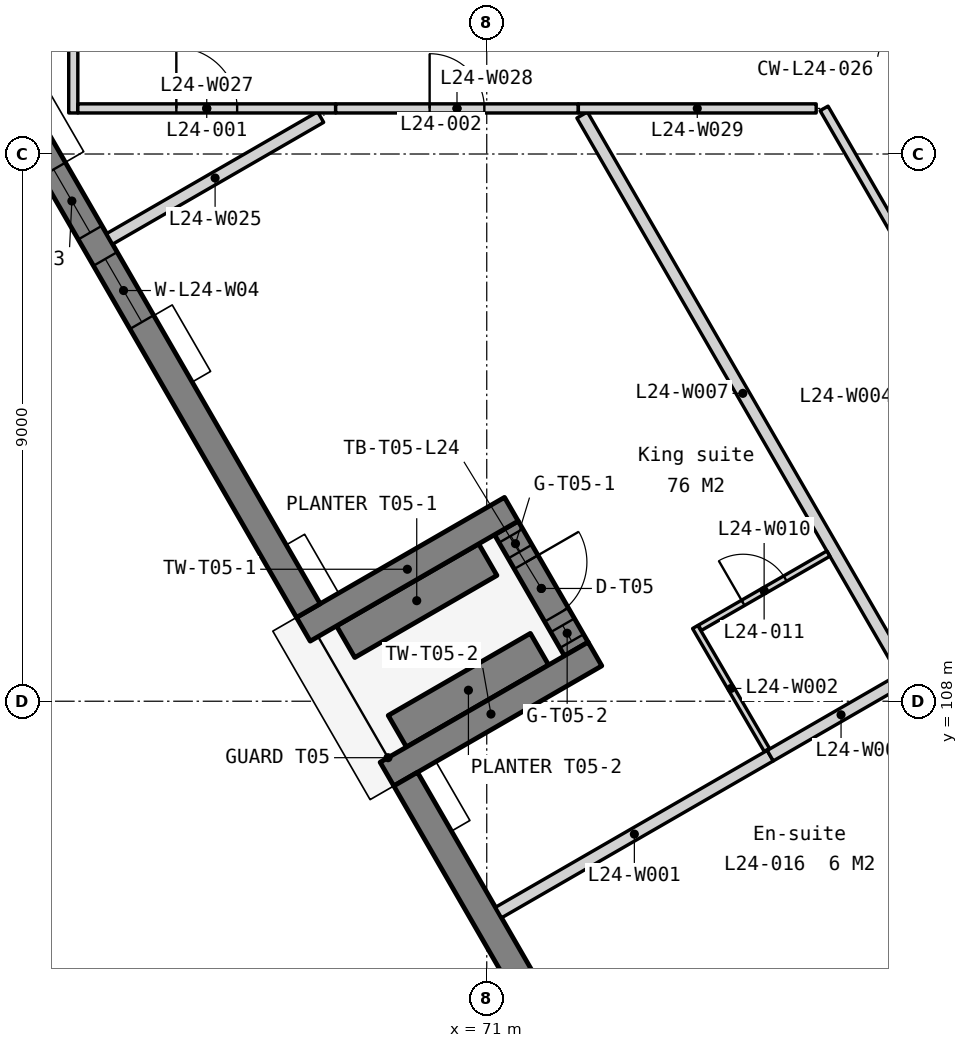
"""IFC4 building model, lengths in metres.
Left out: names, types, materials, properties, quantities, classifications, styles, units other than length and angle.
Written with IfcOpenShell. Run it as: python <this file> out.ifc"""

import sys

from ifc_helpers import new_model, si_unit, direction, frame, frame_2d, origin, place, context, subcontext, project, spatial, polyline, rectangle, outline, extrude, element, fill, save


model = new_model("IFC4")
c1 = context("Model", 3, precision=1e-05, world=origin(), true_north=direction((0.0, 1.0)))
c2 = subcontext(c1, "Body", "Model", "MODEL_VIEW")
j1 = project(units=[si_unit("LENGTHUNIT", "METRE"), si_unit("PLANEANGLEUNIT", "RADIAN")], contexts=[c1])
p1 = place(None, origin())
s1 = spatial("IfcSite", under=j1, at=p1, CompositionType="ELEMENT")
p2 = place(p1, origin())
s2 = spatial("IfcBuilding", under=s1, at=p2, CompositionType="ELEMENT")
p3 = place(p2, frame((0.0, 0.0, 99.3)))
s3 = spatial("IfcBuildingStorey", under=s2, at=p3, CompositionType="ELEMENT", Elevation=99.3)
p4 = place(p3, frame((56.073, 130.263, -0.15), z_axis=(0.0, 0.0, 1.0), x_axis=(0.500002343971, -0.866024050488, 0.0)))
e1 = element("IfcWall", 1, at=p4, inside=s3, PredefinedType="SOLIDWALL", context=c2, shape_type="SweptSolid", body=[
    extrude(outline(polyline([(0.0, 0.0), (0.0, 3.5), (23.986, 3.5), (23.986, 0.0), (0.0, 0.0)])), frame((0.0, 0.225, 0.0), z_axis=(0.0, -1.0, 0.0), x_axis=(1.0, 0.0, 0.0)), (0.0, 0.0, 1.0), 0.45),
])
p5 = place(p4, frame((7.079, 0.0, 1.05)))
e2 = element("IfcOpeningElement", 2, at=p5, cuts=e1, PredefinedType="OPENING", context=c2, shape_type="SweptSolid", body=[
    extrude(rectangle(XDim=1.2, YDim=1.5, at=frame_2d((0.6, 0.75))), frame((0.0, 0.235, 0.0), z_axis=(0.0, -1.0, 0.0), x_axis=(1.0, 0.0, 0.0)), (0.0, 0.0, 1.0), 0.47),
])
p6 = place(p4, frame((8.779, 0.0, 1.05)))
e3 = element("IfcOpeningElement", 3, at=p6, cuts=e1, PredefinedType="OPENING", context=c2, shape_type="SweptSolid", body=[
    extrude(rectangle(XDim=1.2, YDim=1.5, at=frame_2d((0.6, 0.75))), frame((0.0, 0.235, 0.0), z_axis=(0.0, -1.0, 0.0), x_axis=(1.0, 0.0, 0.0)), (0.0, 0.0, 1.0), 0.47),
])
p7 = place(p4, frame((15.607, 0.0, 1.05)))
e4 = element("IfcOpeningElement", 4, at=p7, cuts=e1, PredefinedType="OPENING", context=c2, shape_type="SweptSolid", body=[
    extrude(rectangle(XDim=1.2, YDim=1.5, at=frame_2d((0.6, 0.75))), frame((0.0, 0.235, 0.0), z_axis=(0.0, -1.0, 0.0), x_axis=(1.0, 0.0, 0.0)), (0.0, 0.0, 1.0), 0.47),
])
p8 = place(p4, frame((17.307, 0.0, 1.05)))
e5 = element("IfcOpeningElement", 5, at=p8, cuts=e1, PredefinedType="OPENING", context=c2, shape_type="SweptSolid", body=[
    extrude(rectangle(XDim=1.2, YDim=1.5, at=frame_2d((0.6, 0.75))), frame((0.0, 0.235, 0.0), z_axis=(0.0, -1.0, 0.0), x_axis=(1.0, 0.0, 0.0)), (0.0, 0.0, 1.0), 0.47),
])
p9 = place(p3, frame((69.666, 106.719, -0.15), z_axis=(0.0, 0.0, 1.0), x_axis=(0.499991795389, -0.866030140667, 0.0)))
e6 = element("IfcWall", 6, at=p9, inside=s3, PredefinedType="SOLIDWALL", context=c2, shape_type="SweptSolid", body=[
    extrude(outline(polyline([(15.457, 3.5), (15.457, 0.0), (0.0, 0.0), (0.0, 3.5), (15.457, 3.5)])), frame((0.0, 0.225, 0.0), z_axis=(0.0, -1.0, 0.0), x_axis=(1.0, 0.0, 0.0)), (0.0, 0.0, 1.0), 0.45),
])
p10 = place(p9, frame((5.479, 0.0, 1.05)))
e7 = element("IfcOpeningElement", 7, at=p10, cuts=e6, PredefinedType="OPENING", context=c2, shape_type="SweptSolid", body=[
    extrude(rectangle(XDim=1.2, YDim=1.5, at=frame_2d((0.6, 0.75))), frame((0.0, 0.235, 0.0), z_axis=(0.0, -1.0, 0.0), x_axis=(1.0, 0.0, 0.0)), (0.0, 0.0, 1.0), 0.47),
])
p11 = place(p9, frame((7.179, 0.0, 1.05)))
e8 = element("IfcOpeningElement", 8, at=p11, cuts=e6, PredefinedType="OPENING", context=c2, shape_type="SweptSolid", body=[
    extrude(rectangle(XDim=1.2, YDim=1.5, at=frame_2d((0.6, 0.75))), frame((0.0, 0.235, 0.0), z_axis=(0.0, -1.0, 0.0), x_axis=(1.0, 0.0, 0.0)), (0.0, 0.0, 1.0), 0.47),
])
for number, where, z_axis, x_axis in (
    (9, (67.984, 109.183, 0.0), (0.0, 0.0, 1.0), (0.866, 0.5, 0.0)),
    (10, (69.359, 106.802, 0.0), (0.0, 0.0, 1.0), (0.866, 0.5, 0.0)),
):
    element("IfcWall", number, at=place(p3, frame(where, z_axis=z_axis, x_axis=x_axis)), inside=s3, PredefinedType="SOLIDWALL", context=c2, shape_type="SweptSolid", body=[
        extrude(rectangle(XDim=3.95, YDim=0.45, at=frame_2d((1.975, 0.0))), origin(), (0.0, 0.0, 1.0), 6.85),
    ])
p12 = place(p3, frame((71.322, 110.851, -0.15), z_axis=(0.0, 0.0, 1.0), x_axis=(0.500077740698, -0.865980515519, 0.0)))
e11 = element("IfcWall", 11, at=p12, inside=s3, PredefinedType="SOLIDWALL", context=c2, shape_type="SweptSolid", body=[
    extrude(rectangle(XDim=2.3, YDim=0.45, at=frame_2d((1.15, 0.0))), origin(), (0.0, 0.0, 1.0), 3.5),
])
p13 = place(p12, frame((0.65, 0.0, 0.15)))
e12 = element("IfcOpeningElement", 12, at=p13, cuts=e11, PredefinedType="OPENING", context=c2, shape_type="SweptSolid", body=[
    extrude(rectangle(XDim=1.0, YDim=2.4, at=frame_2d((0.5, 1.2))), frame((0.0, 0.235, 0.0), z_axis=(0.0, -1.0, 0.0), x_axis=(1.0, 0.0, 0.0)), (0.0, 0.0, 1.0), 0.47),
])
p14 = place(p12, frame((0.15, 0.0, 0.15)))
e13 = element("IfcOpeningElement", 13, at=p14, cuts=e11, PredefinedType="OPENING", context=c2, shape_type="SweptSolid", body=[
    extrude(rectangle(XDim=0.3, YDim=2.4, at=frame_2d((0.15, 1.2))), frame((0.0, 0.235, 0.0), z_axis=(0.0, -1.0, 0.0), x_axis=(1.0, 0.0, 0.0)), (0.0, 0.0, 1.0), 0.47),
])
p15 = place(p12, frame((1.85, 0.0, 0.15)))
e14 = element("IfcOpeningElement", 14, at=p15, cuts=e11, PredefinedType="OPENING", context=c2, shape_type="SweptSolid", body=[
    extrude(rectangle(XDim=0.3, YDim=2.4, at=frame_2d((0.15, 1.2))), frame((0.0, 0.235, 0.0), z_axis=(0.0, -1.0, 0.0), x_axis=(1.0, 0.0, 0.0)), (0.0, 0.0, 1.0), 0.47),
])
p16 = place(p3, frame((68.679, 108.978, 0.0), z_axis=(0.0, 0.0, 1.0), x_axis=(0.86599734893, 0.500048589285, 0.0)))
e15 = element("IfcWall", 15, at=p16, inside=s3, PredefinedType="STANDARD", context=c2, shape_type="SweptSolid", body=[
    extrude(rectangle(XDim=2.7, YDim=0.6, at=frame_2d((1.35, 0.0))), origin(), (0.0, 0.0, 1.0), 0.6),
])
p17 = place(p3, frame((69.529, 107.506, 0.0), z_axis=(0.0, 0.0, 1.0), x_axis=(0.866019956843, 0.50000943426, 0.0)))
e16 = element("IfcWall", 16, at=p17, inside=s3, PredefinedType="STANDARD", context=c2, shape_type="SweptSolid", body=[
    extrude(rectangle(XDim=2.7, YDim=0.6, at=frame_2d((1.35, 0.0))), origin(), (0.0, 0.0, 1.0), 0.6),
])
p18 = place(p3, frame((71.193, 104.524, 0.0), z_axis=(0.0, 0.0, 1.0), x_axis=(0.866009872933, 0.50002689926, 0.0)))
e17 = element("IfcWall", 17, at=p18, inside=s3, PredefinedType="PARTITIONING", context=c2, shape_type="SweptSolid", body=[
    extrude(rectangle(XDim=5.16, YDim=0.2, at=frame_2d((2.58, 0.0))), origin(), (0.0, 0.0, 1.0), 3.35),
])
p19 = place(p3, frame((74.428, 109.221, 0.0), z_axis=(0.0, 0.0, 1.0), x_axis=(0.503592070056, -0.863941564561, 0.0)))
e18 = element("IfcWall", 18, at=p19, inside=s3, PredefinedType="PARTITIONING", context=c2, shape_type="SweptSolid", body=[
    extrude(rectangle(XDim=2.34, YDim=0.1, at=frame_2d((1.17, 0.0))), origin(), (0.0, 0.0, 1.0), 3.35),
])
p20 = place(p3, frame((76.548, 117.75, 0.0), z_axis=(0.0, 0.0, 1.0), x_axis=(0.49999404054, -0.866028844453, 0.0)))
e19 = element("IfcWall", 19, at=p20, inside=s3, PredefinedType="PARTITIONING", context=c2, shape_type="SweptSolid", body=[
    extrude(rectangle(XDim=10.946, YDim=0.15, at=frame_2d((5.473, 0.0))), origin(), (0.0, 0.0, 1.0), 3.35),
])
p21 = place(p20, frame((4.973, 0.0, 0.0)))
e20 = element("IfcOpeningElement", 20, at=p21, cuts=e19, PredefinedType="OPENING", context=c2, shape_type="SweptSolid", body=[
    extrude(rectangle(XDim=1.0, YDim=2.1, at=frame_2d((0.5, 1.05))), frame((0.0, 0.085, 0.0), z_axis=(0.0, -1.0, 0.0), x_axis=(1.0, 0.0, 0.0)), (0.0, 0.0, 1.0), 0.17),
])
p22 = place(p3, frame((75.662, 107.104, 0.0), z_axis=(0.0, 0.0, 1.0), x_axis=(0.866028401131, 0.499994808408, 0.0)))
e21 = element("IfcWall", 21, at=p22, inside=s3, PredefinedType="PARTITIONING", context=c2, shape_type="SweptSolid", body=[
    extrude(rectangle(XDim=2.69, YDim=0.2, at=frame_2d((1.345, 0.0))), origin(), (0.0, 0.0, 1.0), 3.35),
])
p23 = place(p3, frame((72.569, 117.642, 0.0), z_axis=(0.0, 0.0, 1.0), x_axis=(0.499993641323, -0.866029074937, 0.0)))
e22 = element("IfcWall", 22, at=p23, inside=s3, PredefinedType="PARTITIONING", context=c2, shape_type="SweptSolid", body=[
    extrude(rectangle(XDim=10.573, YDim=0.2, at=frame_2d((5.286, 0.0))), origin(), (0.0, 0.0, 1.0), 3.35),
])
p24 = place(p3, frame((74.505, 109.208, 0.0), z_axis=(0.0, 0.0, 1.0), x_axis=(0.866048967903, 0.499959183527, 0.0)))
e23 = element("IfcWall", 23, at=p24, inside=s3, PredefinedType="PARTITIONING", context=c2, shape_type="SweptSolid", body=[
    extrude(rectangle(XDim=2.44, YDim=0.1, at=frame_2d((1.22, 0.0))), origin(), (0.0, 0.0, 1.0), 3.35),
])
p25 = place(p24, frame((0.82, 0.0, 0.0)))
e24 = element("IfcOpeningElement", 24, at=p25, cuts=e23, PredefinedType="OPENING", context=c2, shape_type="SweptSolid", body=[
    extrude(rectangle(XDim=0.8, YDim=2.1, at=frame_2d((0.4, 1.05))), frame((0.0, 0.06, 0.0), z_axis=(0.0, -1.0, 0.0), x_axis=(1.0, 0.0, 0.0)), (0.0, 0.0, 1.0), 0.12),
])
p26 = place(p3, frame((64.797, 115.603, 0.0), z_axis=(0.0, 0.0, 1.0), x_axis=(0.866034462328, 0.499984309814, 0.0)))
e25 = element("IfcWall", 25, at=p26, inside=s3, PredefinedType="PARTITIONING", context=c2, shape_type="SweptSolid", body=[
    extrude(rectangle(XDim=4.009, YDim=0.2, at=frame_2d((2.004, 0.0))), origin(), (0.0, 0.0, 1.0), 3.35),
])
p27 = place(p3, frame((64.2, 117.675, 0.0), z_axis=(0.0, 0.0, 1.0), x_axis=(0.0, 1.0, 0.0)))
e26 = element("IfcWall", 26, at=p27, inside=s3, PredefinedType="PARTITIONING", context=c2, shape_type="SweptSolid", body=[
    extrude(rectangle(XDim=3.979, YDim=0.15, at=frame_2d((1.99, 0.0))), origin(), (0.0, 0.0, 1.0), 3.35),
])
p28 = place(p3, frame((64.275, 117.75, 0.0), z_axis=(0.0, 0.0, 1.0), x_axis=(1.0, 0.0, 0.0)))
e27 = element("IfcWall", 27, at=p28, inside=s3, PredefinedType="PARTITIONING", context=c2, shape_type="SweptSolid", body=[
    extrude(rectangle(XDim=4.24, YDim=0.15, at=frame_2d((2.12, 0.0))), origin(), (0.0, 0.0, 1.0), 3.35),
])
p29 = place(p28, frame((1.62, 0.0, 0.0)))
e28 = element("IfcOpeningElement", 28, at=p29, cuts=e27, PredefinedType="OPENING", context=c2, shape_type="SweptSolid", body=[
    extrude(rectangle(XDim=1.0, YDim=2.1, at=frame_2d((0.5, 1.05))), frame((0.0, 0.085, 0.0), z_axis=(0.0, -1.0, 0.0), x_axis=(1.0, 0.0, 0.0)), (0.0, 0.0, 1.0), 0.17),
])
p30 = place(p3, frame((68.515, 117.75, 0.0), z_axis=(0.0, 0.0, 1.0), x_axis=(1.0, 0.0, 0.0)))
e29 = element("IfcWall", 29, at=p30, inside=s3, PredefinedType="PARTITIONING", context=c2, shape_type="SweptSolid", body=[
    extrude(rectangle(XDim=3.991, YDim=0.15, at=frame_2d((1.996, 0.0))), origin(), (0.0, 0.0, 1.0), 3.35),
])
p31 = place(p30, frame((1.546, 0.0, 0.0)))
e30 = element("IfcOpeningElement", 30, at=p31, cuts=e29, PredefinedType="OPENING", context=c2, shape_type="SweptSolid", body=[
    extrude(rectangle(XDim=0.9, YDim=2.1, at=frame_2d((0.45, 1.05))), frame((0.0, 0.085, 0.0), z_axis=(0.0, -1.0, 0.0), x_axis=(1.0, 0.0, 0.0)), (0.0, 0.0, 1.0), 0.17),
])
p32 = place(p3, frame((72.506, 117.75, 0.0), z_axis=(0.0, 0.0, 1.0), x_axis=(1.0, 0.0, 0.0)))
e31 = element("IfcWall", 31, at=p32, inside=s3, PredefinedType="PARTITIONING", context=c2, shape_type="SweptSolid", body=[
    extrude(rectangle(XDim=3.911, YDim=0.15, at=frame_2d((1.956, 0.0))), origin(), (0.0, 0.0, 1.0), 3.35),
])
p33 = place(p7, origin())
e32 = element("IfcWindow", 32, at=p33, inside=s3, PartitioningType="SINGLE_PANEL", PredefinedType="WINDOW", context=c2, shape_type="SweptSolid", body=[
    extrude(rectangle(XDim=1.2, YDim=1.5, at=frame_2d((0.6, 0.75))), frame((0.0, 0.03, 0.0), z_axis=(0.0, -1.0, 0.0), x_axis=(1.0, 0.0, 0.0)), (0.0, 0.0, 1.0), 0.06),
])
fill(e4, e32)
p34 = place(p8, origin())
e33 = element("IfcWindow", 33, at=p34, inside=s3, PartitioningType="SINGLE_PANEL", PredefinedType="WINDOW", context=c2, shape_type="SweptSolid", body=[
    extrude(rectangle(XDim=1.2, YDim=1.5, at=frame_2d((0.6, 0.75))), frame((0.0, 0.03, 0.0), z_axis=(0.0, -1.0, 0.0), x_axis=(1.0, 0.0, 0.0)), (0.0, 0.0, 1.0), 0.06),
])
fill(e5, e33)
p35 = place(p13, origin())
e34 = element("IfcDoor", 34, at=p35, inside=s3, OperationType="SINGLE_SWING_LEFT", PredefinedType="DOOR", context=c2, shape_type="SweptSolid", body=[
    extrude(rectangle(XDim=1.0, YDim=2.4, at=frame_2d((0.5, 1.2))), frame((0.0, 0.025, 0.0), z_axis=(0.0, -1.0, 0.0), x_axis=(1.0, 0.0, 0.0)), (0.0, 0.0, 1.0), 0.05),
])
fill(e12, e34)
p36 = place(p14, origin())
e35 = element("IfcWindow", 35, at=p36, inside=s3, PartitioningType="SINGLE_PANEL", PredefinedType="WINDOW", context=c2, shape_type="SweptSolid", body=[
    extrude(rectangle(XDim=0.3, YDim=2.4, at=frame_2d((0.15, 1.2))), frame((0.0, 0.03, 0.0), z_axis=(0.0, -1.0, 0.0), x_axis=(1.0, 0.0, 0.0)), (0.0, 0.0, 1.0), 0.06),
])
fill(e13, e35)
p37 = place(p15, origin())
e36 = element("IfcWindow", 36, at=p37, inside=s3, PartitioningType="SINGLE_PANEL", PredefinedType="WINDOW", context=c2, shape_type="SweptSolid", body=[
    extrude(rectangle(XDim=0.3, YDim=2.4, at=frame_2d((0.15, 1.2))), frame((0.0, 0.03, 0.0), z_axis=(0.0, -1.0, 0.0), x_axis=(1.0, 0.0, 0.0)), (0.0, 0.0, 1.0), 0.06),
])
fill(e14, e36)
p38 = place(p29, origin())
e37 = element("IfcDoor", 37, at=p38, inside=s3, OperationType="SINGLE_SWING_LEFT", PredefinedType="DOOR", context=c2, shape_type="SweptSolid", body=[
    extrude(rectangle(XDim=1.0, YDim=2.1, at=frame_2d((0.5, 1.05))), frame((0.0, 0.025, 0.0), z_axis=(0.0, -1.0, 0.0), x_axis=(1.0, 0.0, 0.0)), (0.0, 0.0, 1.0), 0.05),
])
fill(e28, e37)
p39 = place(p31, origin())
e38 = element("IfcDoor", 38, at=p39, inside=s3, OperationType="SINGLE_SWING_LEFT", PredefinedType="DOOR", context=c2, shape_type="SweptSolid", body=[
    extrude(rectangle(XDim=0.9, YDim=2.1, at=frame_2d((0.45, 1.05))), frame((0.0, 0.025, 0.0), z_axis=(0.0, -1.0, 0.0), x_axis=(1.0, 0.0, 0.0)), (0.0, 0.0, 1.0), 0.05),
])
fill(e30, e38)
p40 = place(p25, origin())
e39 = element("IfcDoor", 39, at=p40, inside=s3, OperationType="SINGLE_SWING_LEFT", PredefinedType="DOOR", context=c2, shape_type="SweptSolid", body=[
    extrude(rectangle(XDim=0.8, YDim=2.1, at=frame_2d((0.4, 1.05))), frame((0.0, 0.025, 0.0), z_axis=(0.0, -1.0, 0.0), x_axis=(1.0, 0.0, 0.0)), (0.0, 0.0, 1.0), 0.05),
])
fill(e24, e39)
save(model, sys.argv[1])
